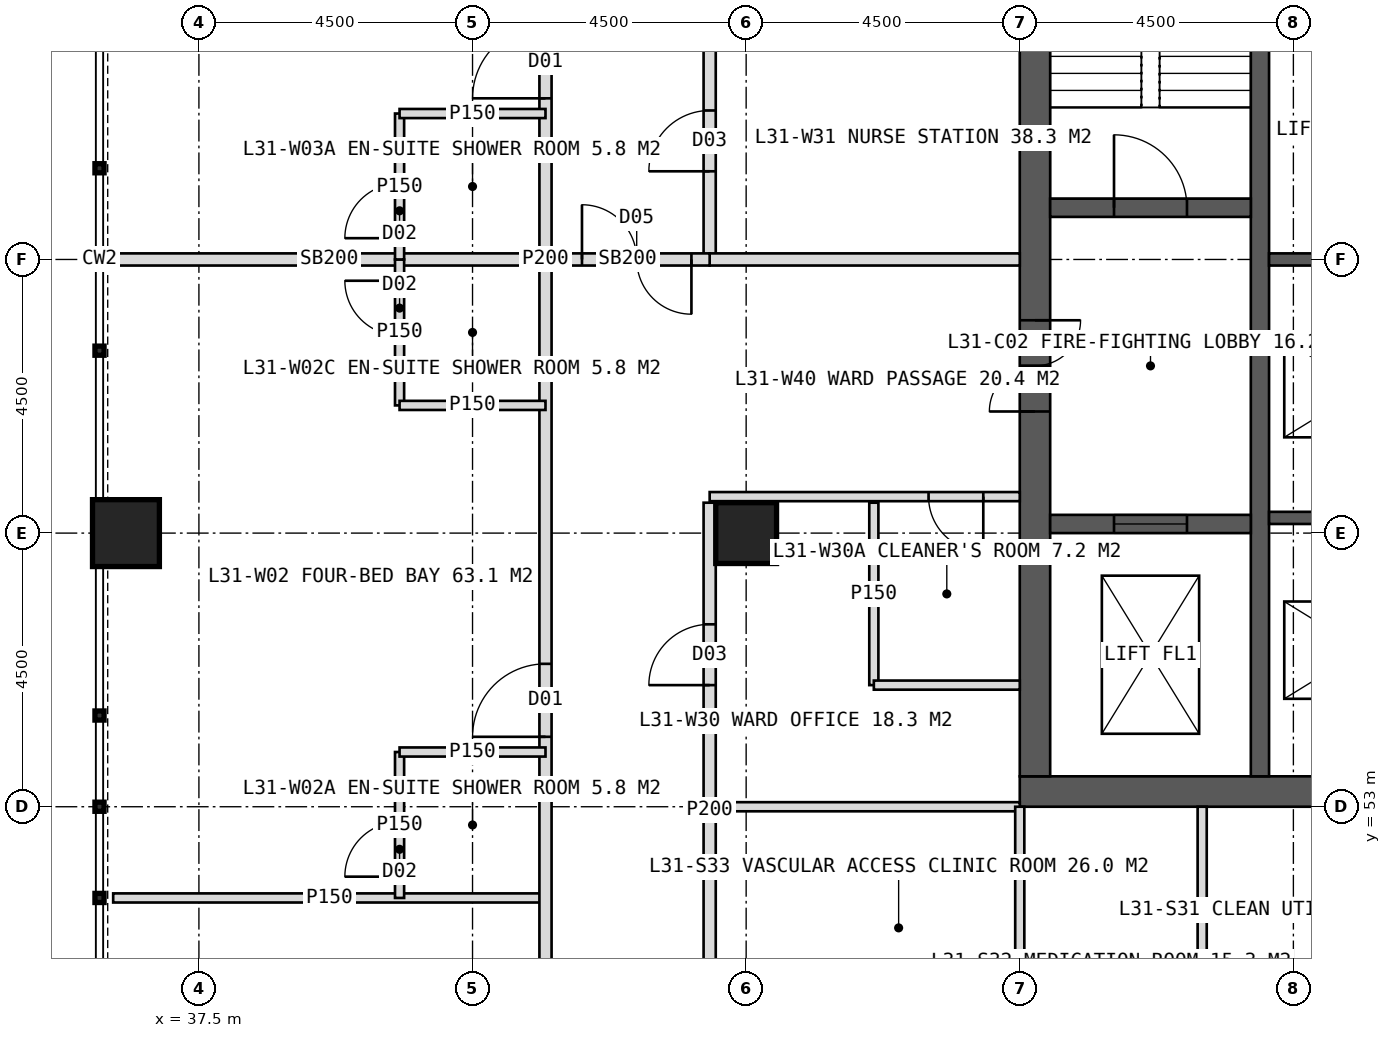
"""IFC4 building model, lengths in metres.
Left out: names, types, materials, properties, quantities, classifications, styles, units other than length and angle.
Written with IfcOpenShell. Run it as: python <this file> out.ifc"""

import sys

from ifc_helpers import new_model, si_unit, direction, frame, frame_2d, origin, origin_2d, place, context, subcontext, project, spatial, rectangle, hollow_rectangle, extrude, element, fill, save


model = new_model("IFC4")
c1 = context("Model", 3, precision=1e-05, world=origin(), true_north=direction((0.0, 1.0)))
c2 = subcontext(c1, "Body", "Model", "MODEL_VIEW")
j1 = project(units=[si_unit("LENGTHUNIT", "METRE"), si_unit("PLANEANGLEUNIT", "RADIAN")], contexts=[c1])
p1 = place(None, origin())
s1 = spatial("IfcSite", under=j1, at=p1, CompositionType="ELEMENT")
p2 = place(p1, origin())
s2 = spatial("IfcBuilding", under=s1, at=p2, CompositionType="ELEMENT")
p3 = place(p2, frame((0.0, 0.0, 132.0)))
s3 = spatial("IfcBuildingStorey", under=s2, at=p3, CompositionType="ELEMENT", Elevation=132.0)
p4 = place(p3, frame((51.0, 53.25, 0.0), z_axis=(0.0, 0.0, 1.0), x_axis=(1.0, 0.0, 0.0)))
e1 = element("IfcWall", 1, at=p4, inside=s3, PredefinedType="SHEAR", context=c2, shape_type="SweptSolid", body=[
    extrude(rectangle(XDim=18.0, YDim=0.5, at=frame_2d((9.0, 0.0))), origin(), (0.0, 0.0, 1.0), 4.0),
])
p5 = place(p4, frame((8.1, 0.0, 0.0)))
e2 = element("IfcOpeningElement", 2, at=p5, cuts=e1, PredefinedType="OPENING", context=c2, shape_type="SweptSolid", body=[
    extrude(rectangle(XDim=1.8, YDim=2.2, at=frame_2d((0.9, 1.1))), frame((0.0, 0.26, 0.0), z_axis=(0.0, -1.0, 0.0), x_axis=(1.0, 0.0, 0.0)), (0.0, 0.0, 1.0), 0.52),
])
p6 = place(p3, frame((51.25, 53.5, 0.0), z_axis=(0.0, 0.0, 1.0), x_axis=(0.0, 1.0, 0.0)))
e3 = element("IfcWall", 3, at=p6, inside=s3, PredefinedType="SHEAR", context=c2, shape_type="SweptSolid", body=[
    extrude(rectangle(XDim=17.0, YDim=0.5, at=frame_2d((8.5, 0.0))), origin(), (0.0, 0.0, 1.0), 4.0),
])
p7 = place(p6, frame((6.0, 0.0, 0.0)))
e4 = element("IfcOpeningElement", 4, at=p7, cuts=e3, PredefinedType="OPENING", context=c2, shape_type="SweptSolid", body=[
    extrude(rectangle(XDim=1.5, YDim=2.2, at=frame_2d((0.75, 1.1))), frame((0.0, 0.26, 0.0), z_axis=(0.0, -1.0, 0.0), x_axis=(1.0, 0.0, 0.0)), (0.0, 0.0, 1.0), 0.52),
])
p8 = place(p3, frame((54.95, 53.5, 0.0), z_axis=(0.0, 0.0, 1.0), x_axis=(0.0, 1.0, 0.0)))
e5 = element("IfcWall", 5, at=p8, inside=s3, PredefinedType="SHEAR", context=c2, shape_type="SweptSolid", body=[
    extrude(rectangle(XDim=17.0, YDim=0.3, at=frame_2d((8.5, 0.0))), origin(), (0.0, 0.0, 1.0), 4.0),
])
for number, where, z_axis, x_axis in (
    (6, (55.1, 57.75, 0.0), (0.0, 0.0, 1.0), (1.0, 0.0, 0.0)),
    (7, (55.1, 62.0, 0.0), (0.0, 0.0, 1.0), (1.0, 0.0, 0.0)),
):
    element("IfcWall", number, at=place(p3, frame(where, z_axis=z_axis, x_axis=x_axis)), inside=s3, PredefinedType="SHEAR", context=c2, shape_type="SweptSolid", body=[
        extrude(rectangle(XDim=3.05, YDim=0.2, at=frame_2d((1.525, 0.0))), origin(), (0.0, 0.0, 1.0), 4.0),
    ])
p9 = place(p3, frame((51.5, 62.85, 0.0), z_axis=(0.0, 0.0, 1.0), x_axis=(1.0, 0.0, 0.0)))
e8 = element("IfcWall", 8, at=p9, inside=s3, PredefinedType="SHEAR", context=c2, shape_type="SweptSolid", body=[
    extrude(rectangle(XDim=3.3, YDim=0.3, at=frame_2d((1.65, 0.0))), origin(), (0.0, 0.0, 1.0), 4.0),
])
p10 = place(p9, frame((1.05, 0.0, 0.0)))
e9 = element("IfcOpeningElement", 9, at=p10, cuts=e8, PredefinedType="OPENING", context=c2, shape_type="SweptSolid", body=[
    extrude(rectangle(XDim=1.2, YDim=2.1, at=frame_2d((0.6, 1.05))), frame((0.0, 0.16, 0.0), z_axis=(0.0, -1.0, 0.0), x_axis=(1.0, 0.0, 0.0)), (0.0, 0.0, 1.0), 0.32),
])
p11 = place(p3, frame((51.5, 57.65, 0.0), z_axis=(0.0, 0.0, 1.0), x_axis=(1.0, 0.0, 0.0)))
e10 = element("IfcWall", 10, at=p11, inside=s3, PredefinedType="SHEAR", context=c2, shape_type="SweptSolid", body=[
    extrude(rectangle(XDim=3.3, YDim=0.3, at=frame_2d((1.65, 0.0))), origin(), (0.0, 0.0, 1.0), 4.0),
])
p12 = place(p11, frame((1.05, 0.0, 0.0)))
e11 = element("IfcOpeningElement", 11, at=p12, cuts=e10, PredefinedType="OPENING", context=c2, shape_type="SweptSolid", body=[
    extrude(rectangle(XDim=1.2, YDim=2.2, at=frame_2d((0.6, 1.1))), frame((0.0, 0.16, 0.0), z_axis=(0.0, -1.0, 0.0), x_axis=(1.0, 0.0, 0.0)), (0.0, 0.0, 1.0), 0.32),
])
p13 = place(p3, frame((46.5, 57.5, 0.0), z_axis=(0.0, 0.0, 1.0), x_axis=(1.0, 0.0, 0.0)))
e12 = element("IfcColumn", 12, at=p13, inside=s3, PredefinedType="COLUMN", context=c2, shape_type="SweptSolid", body=[
    extrude(hollow_rectangle(XDim=1.0, YDim=1.0, WallThickness=0.1, at=origin_2d()), origin(), (0.0, 0.0, 1.0), 4.0),
])
p14 = place(p3, frame((36.3, 57.5, 0.0), z_axis=(0.0, 0.0, 1.0), x_axis=(1.0, 0.0, 0.0)))
e13 = element("IfcColumn", 13, at=p14, inside=s3, PredefinedType="COLUMN", context=c2, shape_type="SweptSolid", body=[
    extrude(hollow_rectangle(XDim=1.1, YDim=1.1, WallThickness=0.1, at=origin_2d()), origin(), (0.0, 0.0, 1.0), 4.0),
])
p15 = place(p3, frame((43.2, 51.5, 0.0), z_axis=(0.0, 0.0, 1.0), x_axis=(-1.0, 0.0, 0.0)))
e14 = element("IfcWall", 14, at=p15, inside=s3, PredefinedType="PARTITIONING", context=c2, shape_type="SweptSolid", body=[
    extrude(rectangle(XDim=7.11, YDim=0.15, at=frame_2d((3.555, 0.0))), origin(), (0.0, 0.0, 1.0), 3.75),
])
p16 = place(p3, frame((43.2, 62.0, 0.0), z_axis=(0.0, 0.0, 1.0), x_axis=(-1.0, 0.0, 0.0)))
e15 = element("IfcWall", 15, at=p16, inside=s3, PredefinedType="SOLIDWALL", context=c2, shape_type="SweptSolid", body=[
    extrude(rectangle(XDim=7.11, YDim=0.2, at=frame_2d((3.555, 0.0))), origin(), (0.0, 0.0, 1.0), 2.95),
])
p17 = place(p3, frame((43.2, 45.2, 0.0), z_axis=(0.0, 0.0, 1.0), x_axis=(0.0, 1.0, 0.0)))
e16 = element("IfcWall", 16, at=p17, inside=s3, PredefinedType="PARTITIONING", context=c2, shape_type="SweptSolid", body=[
    extrude(rectangle(XDim=33.6, YDim=0.2, at=frame_2d((16.8, 0.0))), origin(), (0.0, 0.0, 1.0), 3.75),
])
p18 = place(p17, frame((2.65, 0.0, 0.0)))
e17 = element("IfcOpeningElement", 17, at=p18, cuts=e16, PredefinedType="OPENING", context=c2, shape_type="SweptSolid", body=[
    extrude(rectangle(XDim=1.2, YDim=2.2, at=frame_2d((0.6, 1.1))), frame((0.0, 0.11, 0.0), z_axis=(0.0, -1.0, 0.0), x_axis=(1.0, 0.0, 0.0)), (0.0, 0.0, 1.0), 0.22),
])
p19 = place(p17, frame((8.95, 0.0, 0.0)))
e18 = element("IfcOpeningElement", 18, at=p19, cuts=e16, PredefinedType="OPENING", context=c2, shape_type="SweptSolid", body=[
    extrude(rectangle(XDim=1.2, YDim=2.2, at=frame_2d((0.6, 1.1))), frame((0.0, 0.11, 0.0), z_axis=(0.0, -1.0, 0.0), x_axis=(1.0, 0.0, 0.0)), (0.0, 0.0, 1.0), 0.22),
])
p20 = place(p17, frame((19.45, 0.0, 0.0)))
e19 = element("IfcOpeningElement", 19, at=p20, cuts=e16, PredefinedType="OPENING", context=c2, shape_type="SweptSolid", body=[
    extrude(rectangle(XDim=1.2, YDim=2.2, at=frame_2d((0.6, 1.1))), frame((0.0, 0.11, 0.0), z_axis=(0.0, -1.0, 0.0), x_axis=(1.0, 0.0, 0.0)), (0.0, 0.0, 1.0), 0.22),
])
p21 = place(p17, frame((28.45, 0.0, 0.0)))
e20 = element("IfcOpeningElement", 20, at=p21, cuts=e16, PredefinedType="OPENING", context=c2, shape_type="SweptSolid", body=[
    extrude(rectangle(XDim=1.2, YDim=2.2, at=frame_2d((0.6, 1.1))), frame((0.0, 0.11, 0.0), z_axis=(0.0, -1.0, 0.0), x_axis=(1.0, 0.0, 0.0)), (0.0, 0.0, 1.0), 0.22),
])
p22 = place(p3, frame((40.8, 51.5, 0.0), z_axis=(0.0, 0.0, 1.0), x_axis=(0.0, 1.0, 0.0)))
e21 = element("IfcWall", 21, at=p22, inside=s3, PredefinedType="PARTITIONING", context=c2, shape_type="SweptSolid", body=[
    extrude(rectangle(XDim=2.4, YDim=0.15, at=frame_2d((1.2, 0.0))), origin(), (0.0, 0.0, 1.0), 3.75),
])
p23 = place(p22, frame((0.35, 0.0, 0.0)))
e22 = element("IfcOpeningElement", 22, at=p23, cuts=e21, PredefinedType="OPENING", context=c2, shape_type="SweptSolid", body=[
    extrude(rectangle(XDim=0.9, YDim=2.1, at=frame_2d((0.45, 1.05))), frame((0.0, 0.085, 0.0), z_axis=(0.0, -1.0, 0.0), x_axis=(1.0, 0.0, 0.0)), (0.0, 0.0, 1.0), 0.17),
])
p24 = place(p3, frame((43.2, 53.9, 0.0), z_axis=(0.0, 0.0, 1.0), x_axis=(-1.0, 0.0, 0.0)))
e23 = element("IfcWall", 23, at=p24, inside=s3, PredefinedType="PARTITIONING", context=c2, shape_type="SweptSolid", body=[
    extrude(rectangle(XDim=2.4, YDim=0.15, at=frame_2d((1.2, 0.0))), origin(), (0.0, 0.0, 1.0), 3.75),
])
p25 = place(p3, frame((40.8, 59.6, 0.0), z_axis=(0.0, 0.0, 1.0), x_axis=(0.0, 1.0, 0.0)))
e24 = element("IfcWall", 24, at=p25, inside=s3, PredefinedType="PARTITIONING", context=c2, shape_type="SweptSolid", body=[
    extrude(rectangle(XDim=2.4, YDim=0.15, at=frame_2d((1.2, 0.0))), origin(), (0.0, 0.0, 1.0), 3.75),
])
p26 = place(p25, frame((1.15, 0.0, 0.0)))
e25 = element("IfcOpeningElement", 25, at=p26, cuts=e24, PredefinedType="OPENING", context=c2, shape_type="SweptSolid", body=[
    extrude(rectangle(XDim=0.9, YDim=2.1, at=frame_2d((0.45, 1.05))), frame((0.0, 0.085, 0.0), z_axis=(0.0, -1.0, 0.0), x_axis=(1.0, 0.0, 0.0)), (0.0, 0.0, 1.0), 0.17),
])
p27 = place(p3, frame((43.2, 59.6, 0.0), z_axis=(0.0, 0.0, 1.0), x_axis=(-1.0, 0.0, 0.0)))
e26 = element("IfcWall", 26, at=p27, inside=s3, PredefinedType="PARTITIONING", context=c2, shape_type="SweptSolid", body=[
    extrude(rectangle(XDim=2.4, YDim=0.15, at=frame_2d((1.2, 0.0))), origin(), (0.0, 0.0, 1.0), 3.75),
])
p28 = place(p3, frame((40.8, 62.0, 0.0), z_axis=(0.0, 0.0, 1.0), x_axis=(0.0, 1.0, 0.0)))
e27 = element("IfcWall", 27, at=p28, inside=s3, PredefinedType="PARTITIONING", context=c2, shape_type="SweptSolid", body=[
    extrude(rectangle(XDim=2.4, YDim=0.15, at=frame_2d((1.2, 0.0))), origin(), (0.0, 0.0, 1.0), 3.75),
])
p29 = place(p28, frame((0.35, 0.0, 0.0)))
e28 = element("IfcOpeningElement", 28, at=p29, cuts=e27, PredefinedType="OPENING", context=c2, shape_type="SweptSolid", body=[
    extrude(rectangle(XDim=0.9, YDim=2.1, at=frame_2d((0.45, 1.05))), frame((0.0, 0.085, 0.0), z_axis=(0.0, -1.0, 0.0), x_axis=(1.0, 0.0, 0.0)), (0.0, 0.0, 1.0), 0.17),
])
p30 = place(p3, frame((43.2, 64.4, 0.0), z_axis=(0.0, 0.0, 1.0), x_axis=(-1.0, 0.0, 0.0)))
e29 = element("IfcWall", 29, at=p30, inside=s3, PredefinedType="PARTITIONING", context=c2, shape_type="SweptSolid", body=[
    extrude(rectangle(XDim=2.4, YDim=0.15, at=frame_2d((1.2, 0.0))), origin(), (0.0, 0.0, 1.0), 3.75),
])
p31 = place(p3, frame((51.0, 53.0, 0.0), z_axis=(0.0, 0.0, 1.0), x_axis=(-1.0, 0.0, 0.0)))
e30 = element("IfcWall", 30, at=p31, inside=s3, PredefinedType="PARTITIONING", context=c2, shape_type="SweptSolid", body=[
    extrude(rectangle(XDim=5.1, YDim=0.15, at=frame_2d((2.55, 0.0))), origin(), (0.0, 0.0, 1.0), 3.75),
])
p32 = place(p3, frame((45.9, 47.9, 0.0), z_axis=(0.0, 0.0, 1.0), x_axis=(0.0, 1.0, 0.0)))
e31 = element("IfcWall", 31, at=p32, inside=s3, PredefinedType="PARTITIONING", context=c2, shape_type="SweptSolid", body=[
    extrude(rectangle(XDim=10.1, YDim=0.2, at=frame_2d((5.05, 0.0))), origin(), (0.0, 0.0, 1.0), 3.75),
])
p33 = place(p32, frame((7.1, 0.0, 0.0)))
e32 = element("IfcOpeningElement", 32, at=p33, cuts=e31, PredefinedType="OPENING", context=c2, shape_type="SweptSolid", body=[
    extrude(rectangle(XDim=1.0, YDim=2.1, at=frame_2d((0.5, 1.05))), frame((0.0, 0.11, 0.0), z_axis=(0.0, -1.0, 0.0), x_axis=(1.0, 0.0, 0.0)), (0.0, 0.0, 1.0), 0.22),
])
p34 = place(p3, frame((45.9, 62.0, 0.0), z_axis=(0.0, 0.0, 1.0), x_axis=(0.0, 1.0, 0.0)))
e33 = element("IfcWall", 33, at=p34, inside=s3, PredefinedType="PARTITIONING", context=c2, shape_type="SweptSolid", body=[
    extrude(rectangle(XDim=14.1, YDim=0.2, at=frame_2d((7.05, 0.0))), origin(), (0.0, 0.0, 1.0), 3.75),
])
p35 = place(p34, frame((1.45, 0.0, 0.0)))
e34 = element("IfcOpeningElement", 34, at=p35, cuts=e33, PredefinedType="OPENING", context=c2, shape_type="SweptSolid", body=[
    extrude(rectangle(XDim=1.0, YDim=2.1, at=frame_2d((0.5, 1.05))), frame((0.0, 0.11, 0.0), z_axis=(0.0, -1.0, 0.0), x_axis=(1.0, 0.0, 0.0)), (0.0, 0.0, 1.0), 0.22),
])
p36 = place(p34, frame((10.3, 0.0, 0.0)))
e35 = element("IfcOpeningElement", 35, at=p36, cuts=e33, PredefinedType="OPENING", context=c2, shape_type="SweptSolid", body=[
    extrude(rectangle(XDim=1.0, YDim=2.1, at=frame_2d((0.5, 1.05))), frame((0.0, 0.11, 0.0), z_axis=(0.0, -1.0, 0.0), x_axis=(1.0, 0.0, 0.0)), (0.0, 0.0, 1.0), 0.22),
])
p37 = place(p3, frame((51.0, 58.1, 0.0), z_axis=(0.0, 0.0, 1.0), x_axis=(-1.0, 0.0, 0.0)))
e36 = element("IfcWall", 36, at=p37, inside=s3, PredefinedType="PARTITIONING", context=c2, shape_type="SweptSolid", body=[
    extrude(rectangle(XDim=5.1, YDim=0.15, at=frame_2d((2.55, 0.0))), origin(), (0.0, 0.0, 1.0), 3.75),
])
p38 = place(p37, frame((0.6, 0.0, 0.0)))
e37 = element("IfcOpeningElement", 37, at=p38, cuts=e36, PredefinedType="OPENING", context=c2, shape_type="SweptSolid", body=[
    extrude(rectangle(XDim=0.9, YDim=2.1, at=frame_2d((0.45, 1.05))), frame((0.0, 0.085, 0.0), z_axis=(0.0, -1.0, 0.0), x_axis=(1.0, 0.0, 0.0)), (0.0, 0.0, 1.0), 0.17),
])
p39 = place(p3, frame((51.0, 62.0, 0.0), z_axis=(0.0, 0.0, 1.0), x_axis=(-1.0, 0.0, 0.0)))
e38 = element("IfcWall", 38, at=p39, inside=s3, PredefinedType="SOLIDWALL", context=c2, shape_type="SweptSolid", body=[
    extrude(rectangle(XDim=5.1, YDim=0.2, at=frame_2d((2.55, 0.0))), origin(), (0.0, 0.0, 1.0), 2.95),
])
p40 = place(p3, frame((48.6, 55.0, 0.0), z_axis=(0.0, 0.0, 1.0), x_axis=(0.0, 1.0, 0.0)))
e39 = element("IfcWall", 39, at=p40, inside=s3, PredefinedType="PARTITIONING", context=c2, shape_type="SweptSolid", body=[
    extrude(rectangle(XDim=3.0, YDim=0.15, at=frame_2d((1.5, 0.0))), origin(), (0.0, 0.0, 1.0), 3.75),
])
p41 = place(p3, frame((51.0, 55.0, 0.0), z_axis=(0.0, 0.0, 1.0), x_axis=(-1.0, 0.0, 0.0)))
e40 = element("IfcWall", 40, at=p41, inside=s3, PredefinedType="PARTITIONING", context=c2, shape_type="SweptSolid", body=[
    extrude(rectangle(XDim=2.4, YDim=0.15, at=frame_2d((1.2, 0.0))), origin(), (0.0, 0.0, 1.0), 3.75),
])
for number, where, z_axis, x_axis in (
    (41, (54.0, 53.0, 0.0), (0.0, 0.0, 1.0), (0.0, -1.0, 0.0)),
    (42, (51.0, 53.0, 0.0), (0.0, 0.0, 1.0), (0.0, -1.0, 0.0)),
):
    element("IfcWall", number, at=place(p3, frame(where, z_axis=z_axis, x_axis=x_axis)), inside=s3, PredefinedType="PARTITIONING", context=c2, shape_type="SweptSolid", body=[
        extrude(rectangle(XDim=5.1, YDim=0.15, at=frame_2d((2.55, 0.0))), origin(), (0.0, 0.0, 1.0), 3.75),
    ])
p42 = place(p3, frame((45.9, 62.0, 0.0), z_axis=(0.0, 0.0, 1.0), x_axis=(-1.0, 0.0, 0.0)))
e43 = element("IfcWall", 43, at=p42, inside=s3, PredefinedType="SOLIDWALL", context=c2, shape_type="SweptSolid", body=[
    extrude(rectangle(XDim=2.7, YDim=0.2, at=frame_2d((1.35, 0.0))), origin(), (0.0, 0.0, 1.0), 2.95),
])
p43 = place(p42, frame((0.3, 0.0, 0.0)))
e44 = element("IfcOpeningElement", 44, at=p43, cuts=e43, PredefinedType="OPENING", context=c2, shape_type="SweptSolid", body=[
    extrude(rectangle(XDim=1.8, YDim=2.2, at=frame_2d((0.9, 1.1))), frame((0.0, 0.11, 0.0), z_axis=(0.0, -1.0, 0.0), x_axis=(1.0, 0.0, 0.0)), (0.0, 0.0, 1.0), 0.22),
])
p44 = place(p19, origin())
e45 = element("IfcDoor", 45, at=p44, inside=s3, OperationType="SINGLE_SWING_LEFT", PredefinedType="DOOR", context=c2, shape_type="SweptSolid", body=[
    extrude(rectangle(XDim=1.2, YDim=2.2, at=frame_2d((0.6, 1.1))), frame((0.0, 0.025, 0.0), z_axis=(0.0, -1.0, 0.0), x_axis=(1.0, 0.0, 0.0)), (0.0, 0.0, 1.0), 0.05),
])
fill(e18, e45)
p45 = place(p23, origin())
e46 = element("IfcDoor", 46, at=p45, inside=s3, OperationType="SINGLE_SWING_LEFT", PredefinedType="DOOR", context=c2, shape_type="SweptSolid", body=[
    extrude(rectangle(XDim=0.9, YDim=2.1, at=frame_2d((0.45, 1.05))), frame((0.0, 0.025, 0.0), z_axis=(0.0, -1.0, 0.0), x_axis=(1.0, 0.0, 0.0)), (0.0, 0.0, 1.0), 0.05),
])
fill(e22, e46)
p46 = place(p26, origin())
e47 = element("IfcDoor", 47, at=p46, inside=s3, OperationType="SINGLE_SWING_RIGHT", PredefinedType="DOOR", context=c2, shape_type="SweptSolid", body=[
    extrude(rectangle(XDim=0.9, YDim=2.1, at=frame_2d((0.45, 1.05))), frame((0.0, 0.025, 0.0), z_axis=(0.0, -1.0, 0.0), x_axis=(1.0, 0.0, 0.0)), (0.0, 0.0, 1.0), 0.05),
])
fill(e25, e47)
p47 = place(p20, origin())
e48 = element("IfcDoor", 48, at=p47, inside=s3, OperationType="SINGLE_SWING_LEFT", PredefinedType="DOOR", context=c2, shape_type="SweptSolid", body=[
    extrude(rectangle(XDim=1.2, YDim=2.2, at=frame_2d((0.6, 1.1))), frame((0.0, 0.025, 0.0), z_axis=(0.0, -1.0, 0.0), x_axis=(1.0, 0.0, 0.0)), (0.0, 0.0, 1.0), 0.05),
])
fill(e19, e48)
p48 = place(p29, origin())
e49 = element("IfcDoor", 49, at=p48, inside=s3, OperationType="SINGLE_SWING_LEFT", PredefinedType="DOOR", context=c2, shape_type="SweptSolid", body=[
    extrude(rectangle(XDim=0.9, YDim=2.1, at=frame_2d((0.45, 1.05))), frame((0.0, 0.025, 0.0), z_axis=(0.0, -1.0, 0.0), x_axis=(1.0, 0.0, 0.0)), (0.0, 0.0, 1.0), 0.05),
])
fill(e28, e49)
p49 = place(p38, origin())
e50 = element("IfcDoor", 50, at=p49, inside=s3, OperationType="SINGLE_SWING_LEFT", PredefinedType="DOOR", context=c2, shape_type="SweptSolid", body=[
    extrude(rectangle(XDim=0.9, YDim=2.1, at=frame_2d((0.45, 1.05))), frame((0.0, 0.025, 0.0), z_axis=(0.0, -1.0, 0.0), x_axis=(1.0, 0.0, 0.0)), (0.0, 0.0, 1.0), 0.05),
])
fill(e37, e50)
p50 = place(p33, origin())
e51 = element("IfcDoor", 51, at=p50, inside=s3, OperationType="SINGLE_SWING_LEFT", PredefinedType="DOOR", context=c2, shape_type="SweptSolid", body=[
    extrude(rectangle(XDim=1.0, YDim=2.1, at=frame_2d((0.5, 1.05))), frame((0.0, 0.025, 0.0), z_axis=(0.0, -1.0, 0.0), x_axis=(1.0, 0.0, 0.0)), (0.0, 0.0, 1.0), 0.05),
])
fill(e32, e51)
p51 = place(p35, origin())
e52 = element("IfcDoor", 52, at=p51, inside=s3, OperationType="SINGLE_SWING_LEFT", PredefinedType="DOOR", context=c2, shape_type="SweptSolid", body=[
    extrude(rectangle(XDim=1.0, YDim=2.1, at=frame_2d((0.5, 1.05))), frame((0.0, 0.025, 0.0), z_axis=(0.0, -1.0, 0.0), x_axis=(1.0, 0.0, 0.0)), (0.0, 0.0, 1.0), 0.05),
])
fill(e34, e52)
p52 = place(p43, origin())
e53 = element("IfcDoor", 53, at=p52, inside=s3, OperationType="DOUBLE_DOOR_DOUBLE_SWING", PredefinedType="DOOR", context=c2, shape_type="SweptSolid", body=[
    extrude(rectangle(XDim=1.8, YDim=2.2, at=frame_2d((0.9, 1.1))), frame((0.0, 0.025, 0.0), z_axis=(0.0, -1.0, 0.0), x_axis=(1.0, 0.0, 0.0)), (0.0, 0.0, 1.0), 0.05),
])
fill(e44, e53)
p53 = place(p7, origin())
e54 = element("IfcDoor", 54, at=p53, inside=s3, OperationType="DOUBLE_DOOR_SINGLE_SWING", PredefinedType="DOOR", context=c2, shape_type="SweptSolid", body=[
    extrude(rectangle(XDim=1.5, YDim=2.2, at=frame_2d((0.75, 1.1))), frame((0.0, 0.025, 0.0), z_axis=(0.0, -1.0, 0.0), x_axis=(1.0, 0.0, 0.0)), (0.0, 0.0, 1.0), 0.05),
])
fill(e4, e54)
p54 = place(p10, origin())
e55 = element("IfcDoor", 55, at=p54, inside=s3, OperationType="SINGLE_SWING_LEFT", PredefinedType="DOOR", context=c2, shape_type="SweptSolid", body=[
    extrude(rectangle(XDim=1.2, YDim=2.1, at=frame_2d((0.6, 1.05))), frame((0.0, 0.025, 0.0), z_axis=(0.0, -1.0, 0.0), x_axis=(1.0, 0.0, 0.0)), (0.0, 0.0, 1.0), 0.05),
])
fill(e9, e55)
p55 = place(p12, origin())
e56 = element("IfcDoor", 56, at=p55, inside=s3, OperationType="SLIDING_TO_LEFT", PredefinedType="DOOR", context=c2, shape_type="SweptSolid", body=[
    extrude(rectangle(XDim=1.2, YDim=2.2, at=frame_2d((0.6, 1.1))), frame((0.0, 0.025, 0.0), z_axis=(0.0, -1.0, 0.0), x_axis=(1.0, 0.0, 0.0)), (0.0, 0.0, 1.0), 0.05),
])
fill(e11, e56)
save(model, sys.argv[1])
